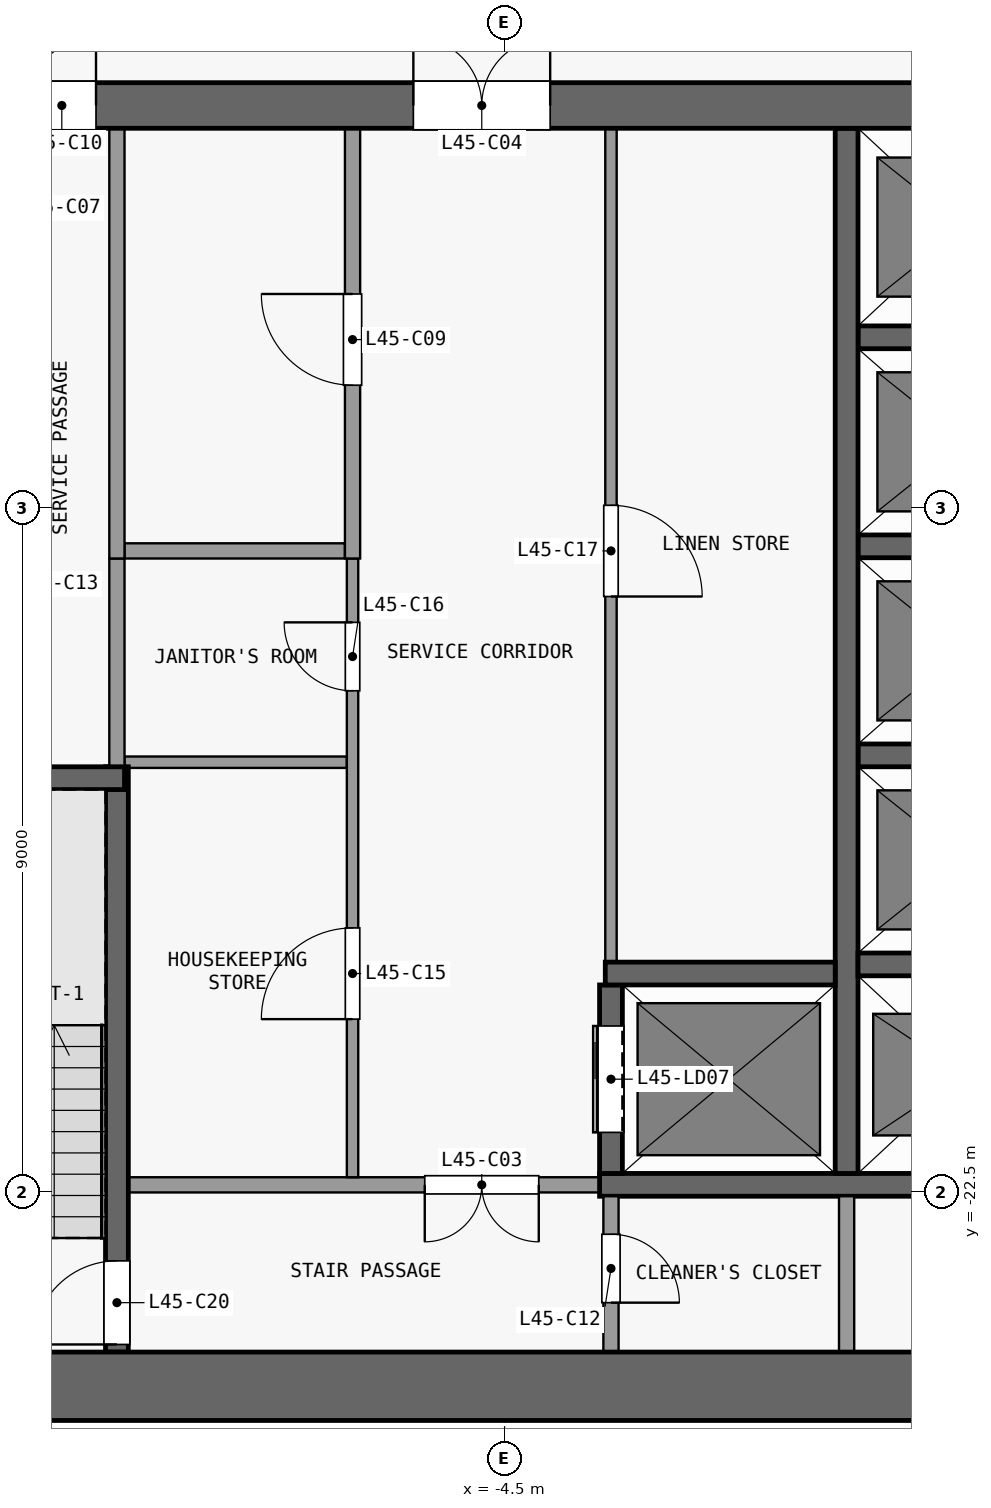
"""IFC4 building model, lengths in metres.
Left out: names, types, materials, properties, quantities, classifications, styles, units other than length and angle.
Written with IfcOpenShell. Run it as: python <this file> out.ifc"""

import sys

from ifc_helpers import new_model, si_unit, direction, frame, frame_2d, origin, place, context, subcontext, project, spatial, rectangle, extrude, element, fill, save


model = new_model("IFC4")
c1 = context("Model", 3, precision=1e-05, world=origin(), true_north=direction((0.0, 1.0)))
c2 = subcontext(c1, "Body", "Model", "MODEL_VIEW")
j1 = project(units=[si_unit("LENGTHUNIT", "METRE"), si_unit("PLANEANGLEUNIT", "RADIAN")], contexts=[c1])
p1 = place(None, origin())
s1 = spatial("IfcSite", under=j1, at=p1, CompositionType="ELEMENT")
p2 = place(p1, origin())
s2 = spatial("IfcBuilding", under=s1, at=p2, CompositionType="ELEMENT")
p3 = place(p2, frame((0.0, 0.0, 181.7)))
s3 = spatial("IfcBuildingStorey", under=s2, at=p3, CompositionType="ELEMENT", Elevation=181.7)
p4 = place(p3, frame((-13.3, -25.05, 0.0), z_axis=(0.0, 0.0, 1.0), x_axis=(1.0, 0.0, 0.0)))
e1 = element("IfcWall", 1, at=p4, inside=s3, PredefinedType="SHEAR", context=c2, shape_type="SweptSolid", body=[
    extrude(rectangle(XDim=26.6, YDim=0.9, at=frame_2d((13.3, 0.0))), origin(), (0.0, 0.0, 1.0), 3.3),
])
p5 = place(p3, frame((-13.3, -8.2, 0.0), z_axis=(0.0, 0.0, 1.0), x_axis=(1.0, 0.0, 0.0)))
e2 = element("IfcWall", 2, at=p5, inside=s3, PredefinedType="SHEAR", context=c2, shape_type="SweptSolid", body=[
    extrude(rectangle(XDim=26.6, YDim=0.6, at=frame_2d((13.3, 0.0))), origin(), (0.0, 0.0, 1.0), 3.3),
])
p6 = place(p5, frame((7.6, 0.0, 0.0)))
e3 = element("IfcOpeningElement", 3, at=p6, cuts=e2, PredefinedType="OPENING", context=c2, shape_type="SweptSolid", body=[
    extrude(rectangle(XDim=1.8, YDim=2.1, at=frame_2d((0.9, 1.05))), frame((0.0, 0.31, 0.0), z_axis=(0.0, -1.0, 0.0), x_axis=(1.0, 0.0, 0.0)), (0.0, 0.0, 1.0), 0.62),
])
p7 = place(p5, frame((17.2, 0.0, 0.0)))
e4 = element("IfcOpeningElement", 4, at=p7, cuts=e2, PredefinedType="OPENING", context=c2, shape_type="SweptSolid", body=[
    extrude(rectangle(XDim=1.8, YDim=2.1, at=frame_2d((0.9, 1.05))), frame((0.0, 0.31, 0.0), z_axis=(0.0, -1.0, 0.0), x_axis=(1.0, 0.0, 0.0)), (0.0, 0.0, 1.0), 0.62),
])
p8 = place(p5, frame((2.525, 0.0, 0.0)))
e5 = element("IfcOpeningElement", 5, at=p8, cuts=e2, PredefinedType="OPENING", context=c2, shape_type="SweptSolid", body=[
    extrude(rectangle(XDim=0.9, YDim=2.1, at=frame_2d((0.45, 1.05))), frame((0.0, 0.31, 0.0), z_axis=(0.0, -1.0, 0.0), x_axis=(1.0, 0.0, 0.0)), (0.0, 0.0, 1.0), 0.62),
])
p9 = place(p5, frame((23.175, 0.0, 0.0)))
e6 = element("IfcOpeningElement", 6, at=p9, cuts=e2, PredefinedType="OPENING", context=c2, shape_type="SweptSolid", body=[
    extrude(rectangle(XDim=0.9, YDim=2.1, at=frame_2d((0.45, 1.05))), frame((0.0, 0.31, 0.0), z_axis=(0.0, -1.0, 0.0), x_axis=(1.0, 0.0, 0.0)), (0.0, 0.0, 1.0), 0.62),
])
p10 = place(p3, frame((-3.25, -22.4, 0.0), z_axis=(0.0, 0.0, 1.0), x_axis=(-1.0, 0.0, 0.0)))
e7 = element("IfcWall", 7, at=p10, inside=s3, PredefinedType="PARTITIONING", context=c2, shape_type="SweptSolid", body=[
    extrude(rectangle(XDim=6.2, YDim=0.2, at=frame_2d((3.1, 0.0))), origin(), (0.0, 0.0, 1.0), 3.3),
])
p11 = place(p10, frame((0.8, 0.0, 0.0)))
e8 = element("IfcOpeningElement", 8, at=p11, cuts=e7, PredefinedType="OPENING", context=c2, shape_type="SweptSolid", body=[
    extrude(rectangle(XDim=1.5, YDim=2.1, at=frame_2d((0.75, 1.05))), frame((0.0, 0.11, 0.0), z_axis=(0.0, -1.0, 0.0), x_axis=(1.0, 0.0, 0.0)), (0.0, 0.0, 1.0), 0.22),
])
p12 = place(p3, frame((-3.25, -22.4, 0.0), z_axis=(0.0, 0.0, 1.0), x_axis=(1.0, 0.0, 0.0)))
e9 = element("IfcWall", 9, at=p12, inside=s3, PredefinedType="SHEAR", context=c2, shape_type="SweptSolid", body=[
    extrude(rectangle(XDim=6.2, YDim=0.3, at=frame_2d((3.1, 0.0))), origin(), (0.0, 0.0, 1.0), 3.3),
])
p13 = place(p3, frame((-3.175, -19.62, 0.0), z_axis=(0.0, 0.0, 1.0), x_axis=(1.0, 0.0, 0.0)))
e10 = element("IfcWall", 10, at=p13, inside=s3, PredefinedType="SHEAR", context=c2, shape_type="SweptSolid", body=[
    extrude(rectangle(XDim=3.025, YDim=0.3, at=frame_2d((1.513, 0.0))), origin(), (0.0, 0.0, 1.0), 3.3),
])
p14 = place(p3, frame((0.15, -19.5, 0.0), z_axis=(0.0, 0.0, 1.0), x_axis=(1.0, 0.0, 0.0)))
e11 = element("IfcWall", 11, at=p14, inside=s3, PredefinedType="SHEAR", context=c2, shape_type="SweptSolid", body=[
    extrude(rectangle(XDim=2.8, YDim=0.3, at=frame_2d((1.4, 0.0))), origin(), (0.0, 0.0, 1.0), 3.3),
])
p15 = place(p3, frame((-12.6, -17.05, 0.0), z_axis=(0.0, 0.0, 1.0), x_axis=(1.0, 0.0, 0.0)))
e12 = element("IfcWall", 12, at=p15, inside=s3, PredefinedType="SHEAR", context=c2, shape_type="SweptSolid", body=[
    extrude(rectangle(XDim=3.1, YDim=0.3, at=frame_2d((1.55, 0.0))), origin(), (0.0, 0.0, 1.0), 3.3),
])
p16 = place(p3, frame((-9.5, -16.84, 0.0), z_axis=(0.0, 0.0, 1.0), x_axis=(1.0, 0.0, 0.0)))
e13 = element("IfcWall", 13, at=p16, inside=s3, PredefinedType="PARTITIONING", context=c2, shape_type="SweptSolid", body=[
    extrude(rectangle(XDim=2.925, YDim=0.15, at=frame_2d((1.462, 0.0))), origin(), (0.0, 0.0, 1.0), 3.3),
])
p17 = place(p3, frame((0.15, -16.75, 0.0), z_axis=(0.0, 0.0, 1.0), x_axis=(1.0, 0.0, 0.0)))
e14 = element("IfcWall", 14, at=p17, inside=s3, PredefinedType="SHEAR", context=c2, shape_type="SweptSolid", body=[
    extrude(rectangle(XDim=2.8, YDim=0.3, at=frame_2d((1.4, 0.0))), origin(), (0.0, 0.0, 1.0), 3.3),
])
p18 = place(p3, frame((-9.5, -14.06, 0.0), z_axis=(0.0, 0.0, 1.0), x_axis=(1.0, 0.0, 0.0)))
e15 = element("IfcWall", 15, at=p18, inside=s3, PredefinedType="PARTITIONING", context=c2, shape_type="SweptSolid", body=[
    extrude(rectangle(XDim=2.9, YDim=0.2, at=frame_2d((1.45, 0.0))), origin(), (0.0, 0.0, 1.0), 3.3),
])
for number, where, z_axis, x_axis in (
    (16, (0.15, -14.0, 0.0), (0.0, 0.0, 1.0), (1.0, 0.0, 0.0)),
    (17, (0.15, -11.25, 0.0), (0.0, 0.0, 1.0), (1.0, 0.0, 0.0)),
):
    element("IfcWall", number, at=place(p3, frame(where, z_axis=z_axis, x_axis=x_axis)), inside=s3, PredefinedType="SHEAR", context=c2, shape_type="SweptSolid", body=[
        extrude(rectangle(XDim=2.8, YDim=0.3, at=frame_2d((1.4, 0.0))), origin(), (0.0, 0.0, 1.0), 3.3),
    ])
p19 = place(p3, frame((-9.6, -24.6, 0.0), z_axis=(0.0, 0.0, 1.0), x_axis=(0.0, 1.0, 0.0)))
e18 = element("IfcWall", 18, at=p19, inside=s3, PredefinedType="SHEAR", context=c2, shape_type="SweptSolid", body=[
    extrude(rectangle(XDim=7.7, YDim=0.3, at=frame_2d((3.85, 0.0))), origin(), (0.0, 0.0, 1.0), 3.3),
])
p20 = place(p19, frame((0.1, 0.0, 0.0)))
e19 = element("IfcOpeningElement", 19, at=p20, cuts=e18, PredefinedType="OPENING", context=c2, shape_type="SweptSolid", body=[
    extrude(rectangle(XDim=1.1, YDim=2.1, at=frame_2d((0.55, 1.05))), frame((0.0, 0.16, 0.0), z_axis=(0.0, -1.0, 0.0), x_axis=(1.0, 0.0, 0.0)), (0.0, 0.0, 1.0), 0.32),
])
p21 = place(p3, frame((-9.6, -16.9, 0.0), z_axis=(0.0, 0.0, 1.0), x_axis=(0.0, 1.0, 0.0)))
e20 = element("IfcWall", 20, at=p21, inside=s3, PredefinedType="PARTITIONING", context=c2, shape_type="SweptSolid", body=[
    extrude(rectangle(XDim=2.74, YDim=0.2, at=frame_2d((1.37, 0.0))), origin(), (0.0, 0.0, 1.0), 3.3),
])
p22 = place(p3, frame((-9.6, -14.16, 0.0), z_axis=(0.0, 0.0, 1.0), x_axis=(0.0, 1.0, 0.0)))
e21 = element("IfcWall", 21, at=p22, inside=s3, PredefinedType="PARTITIONING", context=c2, shape_type="SweptSolid", body=[
    extrude(rectangle(XDim=5.66, YDim=0.2, at=frame_2d((2.83, 0.0))), origin(), (0.0, 0.0, 1.0), 3.3),
])
p23 = place(p3, frame((-6.5, -22.3, 0.0), z_axis=(0.0, 0.0, 1.0), x_axis=(0.0, 1.0, 0.0)))
e22 = element("IfcWall", 22, at=p23, inside=s3, PredefinedType="PARTITIONING", context=c2, shape_type="SweptSolid", body=[
    extrude(rectangle(XDim=8.14, YDim=0.15, at=frame_2d((4.07, 0.0))), origin(), (0.0, 0.0, 1.0), 3.3),
])
p24 = place(p23, frame((2.08, 0.0, 0.0)))
e23 = element("IfcOpeningElement", 23, at=p24, cuts=e22, PredefinedType="OPENING", context=c2, shape_type="SweptSolid", body=[
    extrude(rectangle(XDim=1.2, YDim=2.1, at=frame_2d((0.6, 1.05))), frame((0.0, 0.085, 0.0), z_axis=(0.0, -1.0, 0.0), x_axis=(1.0, 0.0, 0.0)), (0.0, 0.0, 1.0), 0.17),
])
p25 = place(p23, frame((6.4, 0.0, 0.0)))
e24 = element("IfcOpeningElement", 24, at=p25, cuts=e22, PredefinedType="OPENING", context=c2, shape_type="SweptSolid", body=[
    extrude(rectangle(XDim=0.9, YDim=2.1, at=frame_2d((0.45, 1.05))), frame((0.0, 0.085, 0.0), z_axis=(0.0, -1.0, 0.0), x_axis=(1.0, 0.0, 0.0)), (0.0, 0.0, 1.0), 0.17),
])
p26 = place(p3, frame((-6.5, -14.16, 0.0), z_axis=(0.0, 0.0, 1.0), x_axis=(0.0, 1.0, 0.0)))
e25 = element("IfcWall", 25, at=p26, inside=s3, PredefinedType="PARTITIONING", context=c2, shape_type="SweptSolid", body=[
    extrude(rectangle(XDim=5.66, YDim=0.2, at=frame_2d((2.83, 0.0))), origin(), (0.0, 0.0, 1.0), 3.3),
])
p27 = place(p26, frame((2.28, 0.0, 0.0)))
e26 = element("IfcOpeningElement", 26, at=p27, cuts=e25, PredefinedType="OPENING", context=c2, shape_type="SweptSolid", body=[
    extrude(rectangle(XDim=1.2, YDim=2.1, at=frame_2d((0.6, 1.05))), frame((0.0, 0.11, 0.0), z_axis=(0.0, -1.0, 0.0), x_axis=(1.0, 0.0, 0.0)), (0.0, 0.0, 1.0), 0.22),
])
p28 = place(p3, frame((-3.1, -22.55, 0.0), z_axis=(0.0, 0.0, 1.0), x_axis=(0.0, -1.0, 0.0)))
e27 = element("IfcWall", 27, at=p28, inside=s3, PredefinedType="PARTITIONING", context=c2, shape_type="SweptSolid", body=[
    extrude(rectangle(XDim=2.05, YDim=0.2, at=frame_2d((1.025, 0.0))), origin(), (0.0, 0.0, 1.0), 3.3),
])
p29 = place(p28, frame((0.5, 0.0, 0.0)))
e28 = element("IfcOpeningElement", 28, at=p29, cuts=e27, PredefinedType="OPENING", context=c2, shape_type="SweptSolid", body=[
    extrude(rectangle(XDim=0.9, YDim=2.1, at=frame_2d((0.45, 1.05))), frame((0.0, 0.11, 0.0), z_axis=(0.0, -1.0, 0.0), x_axis=(1.0, 0.0, 0.0)), (0.0, 0.0, 1.0), 0.22),
])
p30 = place(p3, frame((-3.1, -22.25, 0.0), z_axis=(0.0, 0.0, 1.0), x_axis=(0.0, 1.0, 0.0)))
e29 = element("IfcWall", 29, at=p30, inside=s3, PredefinedType="SHEAR", context=c2, shape_type="SweptSolid", body=[
    extrude(rectangle(XDim=2.48, YDim=0.3, at=frame_2d((1.24, 0.0))), origin(), (0.0, 0.0, 1.0), 3.3),
])
p31 = place(p30, frame((0.54, 0.0, 0.0)))
e30 = element("IfcOpeningElement", 30, at=p31, cuts=e29, PredefinedType="OPENING", context=c2, shape_type="SweptSolid", body=[
    extrude(rectangle(XDim=1.4, YDim=2.1, at=frame_2d((0.7, 1.05))), frame((0.0, 0.16, 0.0), z_axis=(0.0, -1.0, 0.0), x_axis=(1.0, 0.0, 0.0)), (0.0, 0.0, 1.0), 0.32),
])
p32 = place(p3, frame((-3.1, -8.5, 0.0), z_axis=(0.0, 0.0, 1.0), x_axis=(0.0, -1.0, 0.0)))
e31 = element("IfcWall", 31, at=p32, inside=s3, PredefinedType="PARTITIONING", context=c2, shape_type="SweptSolid", body=[
    extrude(rectangle(XDim=10.97, YDim=0.15, at=frame_2d((5.485, 0.0))), origin(), (0.0, 0.0, 1.0), 3.3),
])
p33 = place(p32, frame((4.96, 0.0, 0.0)))
e32 = element("IfcOpeningElement", 32, at=p33, cuts=e31, PredefinedType="OPENING", context=c2, shape_type="SweptSolid", body=[
    extrude(rectangle(XDim=1.2, YDim=2.1, at=frame_2d((0.6, 1.05))), frame((0.0, 0.085, 0.0), z_axis=(0.0, -1.0, 0.0), x_axis=(1.0, 0.0, 0.0)), (0.0, 0.0, 1.0), 0.17),
])
p34 = place(p3, frame((0.0, -24.6, 0.0), z_axis=(0.0, 0.0, 1.0), x_axis=(0.0, 1.0, 0.0)))
e33 = element("IfcWall", 33, at=p34, inside=s3, PredefinedType="PARTITIONING", context=c2, shape_type="SweptSolid", body=[
    extrude(rectangle(XDim=2.05, YDim=0.2, at=frame_2d((1.025, 0.0))), origin(), (0.0, 0.0, 1.0), 3.3),
])
p35 = place(p3, frame((0.0, -22.25, 0.0), z_axis=(0.0, 0.0, 1.0), x_axis=(0.0, 1.0, 0.0)))
e34 = element("IfcWall", 34, at=p35, inside=s3, PredefinedType="SHEAR", context=c2, shape_type="SweptSolid", body=[
    extrude(rectangle(XDim=13.75, YDim=0.3, at=frame_2d((6.875, 0.0))), origin(), (0.0, 0.0, 1.0), 3.3),
])
p36 = place(p31, origin())
e35 = element("IfcDoor", 35, at=p36, inside=s3, OperationType="DOUBLE_DOOR_SLIDING", PredefinedType="DOOR", context=c2, shape_type="SweptSolid", body=[
    extrude(rectangle(XDim=1.4, YDim=2.1, at=frame_2d((0.7, 1.05))), frame((0.0, 0.025, 0.0), z_axis=(0.0, -1.0, 0.0), x_axis=(1.0, 0.0, 0.0)), (0.0, 0.0, 1.0), 0.05),
])
fill(e30, e35)
p37 = place(p11, origin())
e36 = element("IfcDoor", 36, at=p37, inside=s3, OperationType="DOUBLE_DOOR_SINGLE_SWING", PredefinedType="DOOR", context=c2, shape_type="SweptSolid", body=[
    extrude(rectangle(XDim=1.5, YDim=2.1, at=frame_2d((0.75, 1.05))), frame((0.0, 0.025, 0.0), z_axis=(0.0, -1.0, 0.0), x_axis=(1.0, 0.0, 0.0)), (0.0, 0.0, 1.0), 0.05),
])
fill(e8, e36)
p38 = place(p6, origin())
e37 = element("IfcDoor", 37, at=p38, inside=s3, OperationType="DOUBLE_DOOR_SINGLE_SWING", PredefinedType="DOOR", context=c2, shape_type="SweptSolid", body=[
    extrude(rectangle(XDim=1.8, YDim=2.1, at=frame_2d((0.9, 1.05))), frame((0.0, 0.025, 0.0), z_axis=(0.0, -1.0, 0.0), x_axis=(1.0, 0.0, 0.0)), (0.0, 0.0, 1.0), 0.05),
])
fill(e3, e37)
p39 = place(p27, origin())
e38 = element("IfcDoor", 38, at=p39, inside=s3, OperationType="SINGLE_SWING_RIGHT", PredefinedType="DOOR", context=c2, shape_type="SweptSolid", body=[
    extrude(rectangle(XDim=1.2, YDim=2.1, at=frame_2d((0.6, 1.05))), frame((0.0, 0.025, 0.0), z_axis=(0.0, -1.0, 0.0), x_axis=(1.0, 0.0, 0.0)), (0.0, 0.0, 1.0), 0.05),
])
fill(e26, e38)
p40 = place(p8, origin())
e39 = element("IfcDoor", 39, at=p40, inside=s3, OperationType="SINGLE_SWING_RIGHT", PredefinedType="DOOR", context=c2, shape_type="SweptSolid", body=[
    extrude(rectangle(XDim=0.9, YDim=2.1, at=frame_2d((0.45, 1.05))), frame((0.0, 0.025, 0.0), z_axis=(0.0, -1.0, 0.0), x_axis=(1.0, 0.0, 0.0)), (0.0, 0.0, 1.0), 0.05),
])
fill(e5, e39)
p41 = place(p29, origin())
e40 = element("IfcDoor", 40, at=p41, inside=s3, OperationType="SINGLE_SWING_RIGHT", PredefinedType="DOOR", context=c2, shape_type="SweptSolid", body=[
    extrude(rectangle(XDim=0.9, YDim=2.1, at=frame_2d((0.45, 1.05))), frame((0.0, 0.025, 0.0), z_axis=(0.0, -1.0, 0.0), x_axis=(1.0, 0.0, 0.0)), (0.0, 0.0, 1.0), 0.05),
])
fill(e28, e40)
p42 = place(p24, origin())
e41 = element("IfcDoor", 41, at=p42, inside=s3, OperationType="SINGLE_SWING_LEFT", PredefinedType="DOOR", context=c2, shape_type="SweptSolid", body=[
    extrude(rectangle(XDim=1.2, YDim=2.1, at=frame_2d((0.6, 1.05))), frame((0.0, 0.025, 0.0), z_axis=(0.0, -1.0, 0.0), x_axis=(1.0, 0.0, 0.0)), (0.0, 0.0, 1.0), 0.05),
])
fill(e23, e41)
p43 = place(p25, origin())
e42 = element("IfcDoor", 42, at=p43, inside=s3, OperationType="SINGLE_SWING_RIGHT", PredefinedType="DOOR", context=c2, shape_type="SweptSolid", body=[
    extrude(rectangle(XDim=0.9, YDim=2.1, at=frame_2d((0.45, 1.05))), frame((0.0, 0.025, 0.0), z_axis=(0.0, -1.0, 0.0), x_axis=(1.0, 0.0, 0.0)), (0.0, 0.0, 1.0), 0.05),
])
fill(e24, e42)
p44 = place(p33, origin())
e43 = element("IfcDoor", 43, at=p44, inside=s3, OperationType="SINGLE_SWING_RIGHT", PredefinedType="DOOR", context=c2, shape_type="SweptSolid", body=[
    extrude(rectangle(XDim=1.2, YDim=2.1, at=frame_2d((0.6, 1.05))), frame((0.0, 0.025, 0.0), z_axis=(0.0, -1.0, 0.0), x_axis=(1.0, 0.0, 0.0)), (0.0, 0.0, 1.0), 0.05),
])
fill(e32, e43)
p45 = place(p20, origin())
e44 = element("IfcDoor", 44, at=p45, inside=s3, OperationType="SINGLE_SWING_LEFT", PredefinedType="DOOR", context=c2, shape_type="SweptSolid", body=[
    extrude(rectangle(XDim=1.1, YDim=2.1, at=frame_2d((0.55, 1.05))), frame((0.0, 0.025, 0.0), z_axis=(0.0, -1.0, 0.0), x_axis=(1.0, 0.0, 0.0)), (0.0, 0.0, 1.0), 0.05),
])
fill(e19, e44)
save(model, sys.argv[1])
